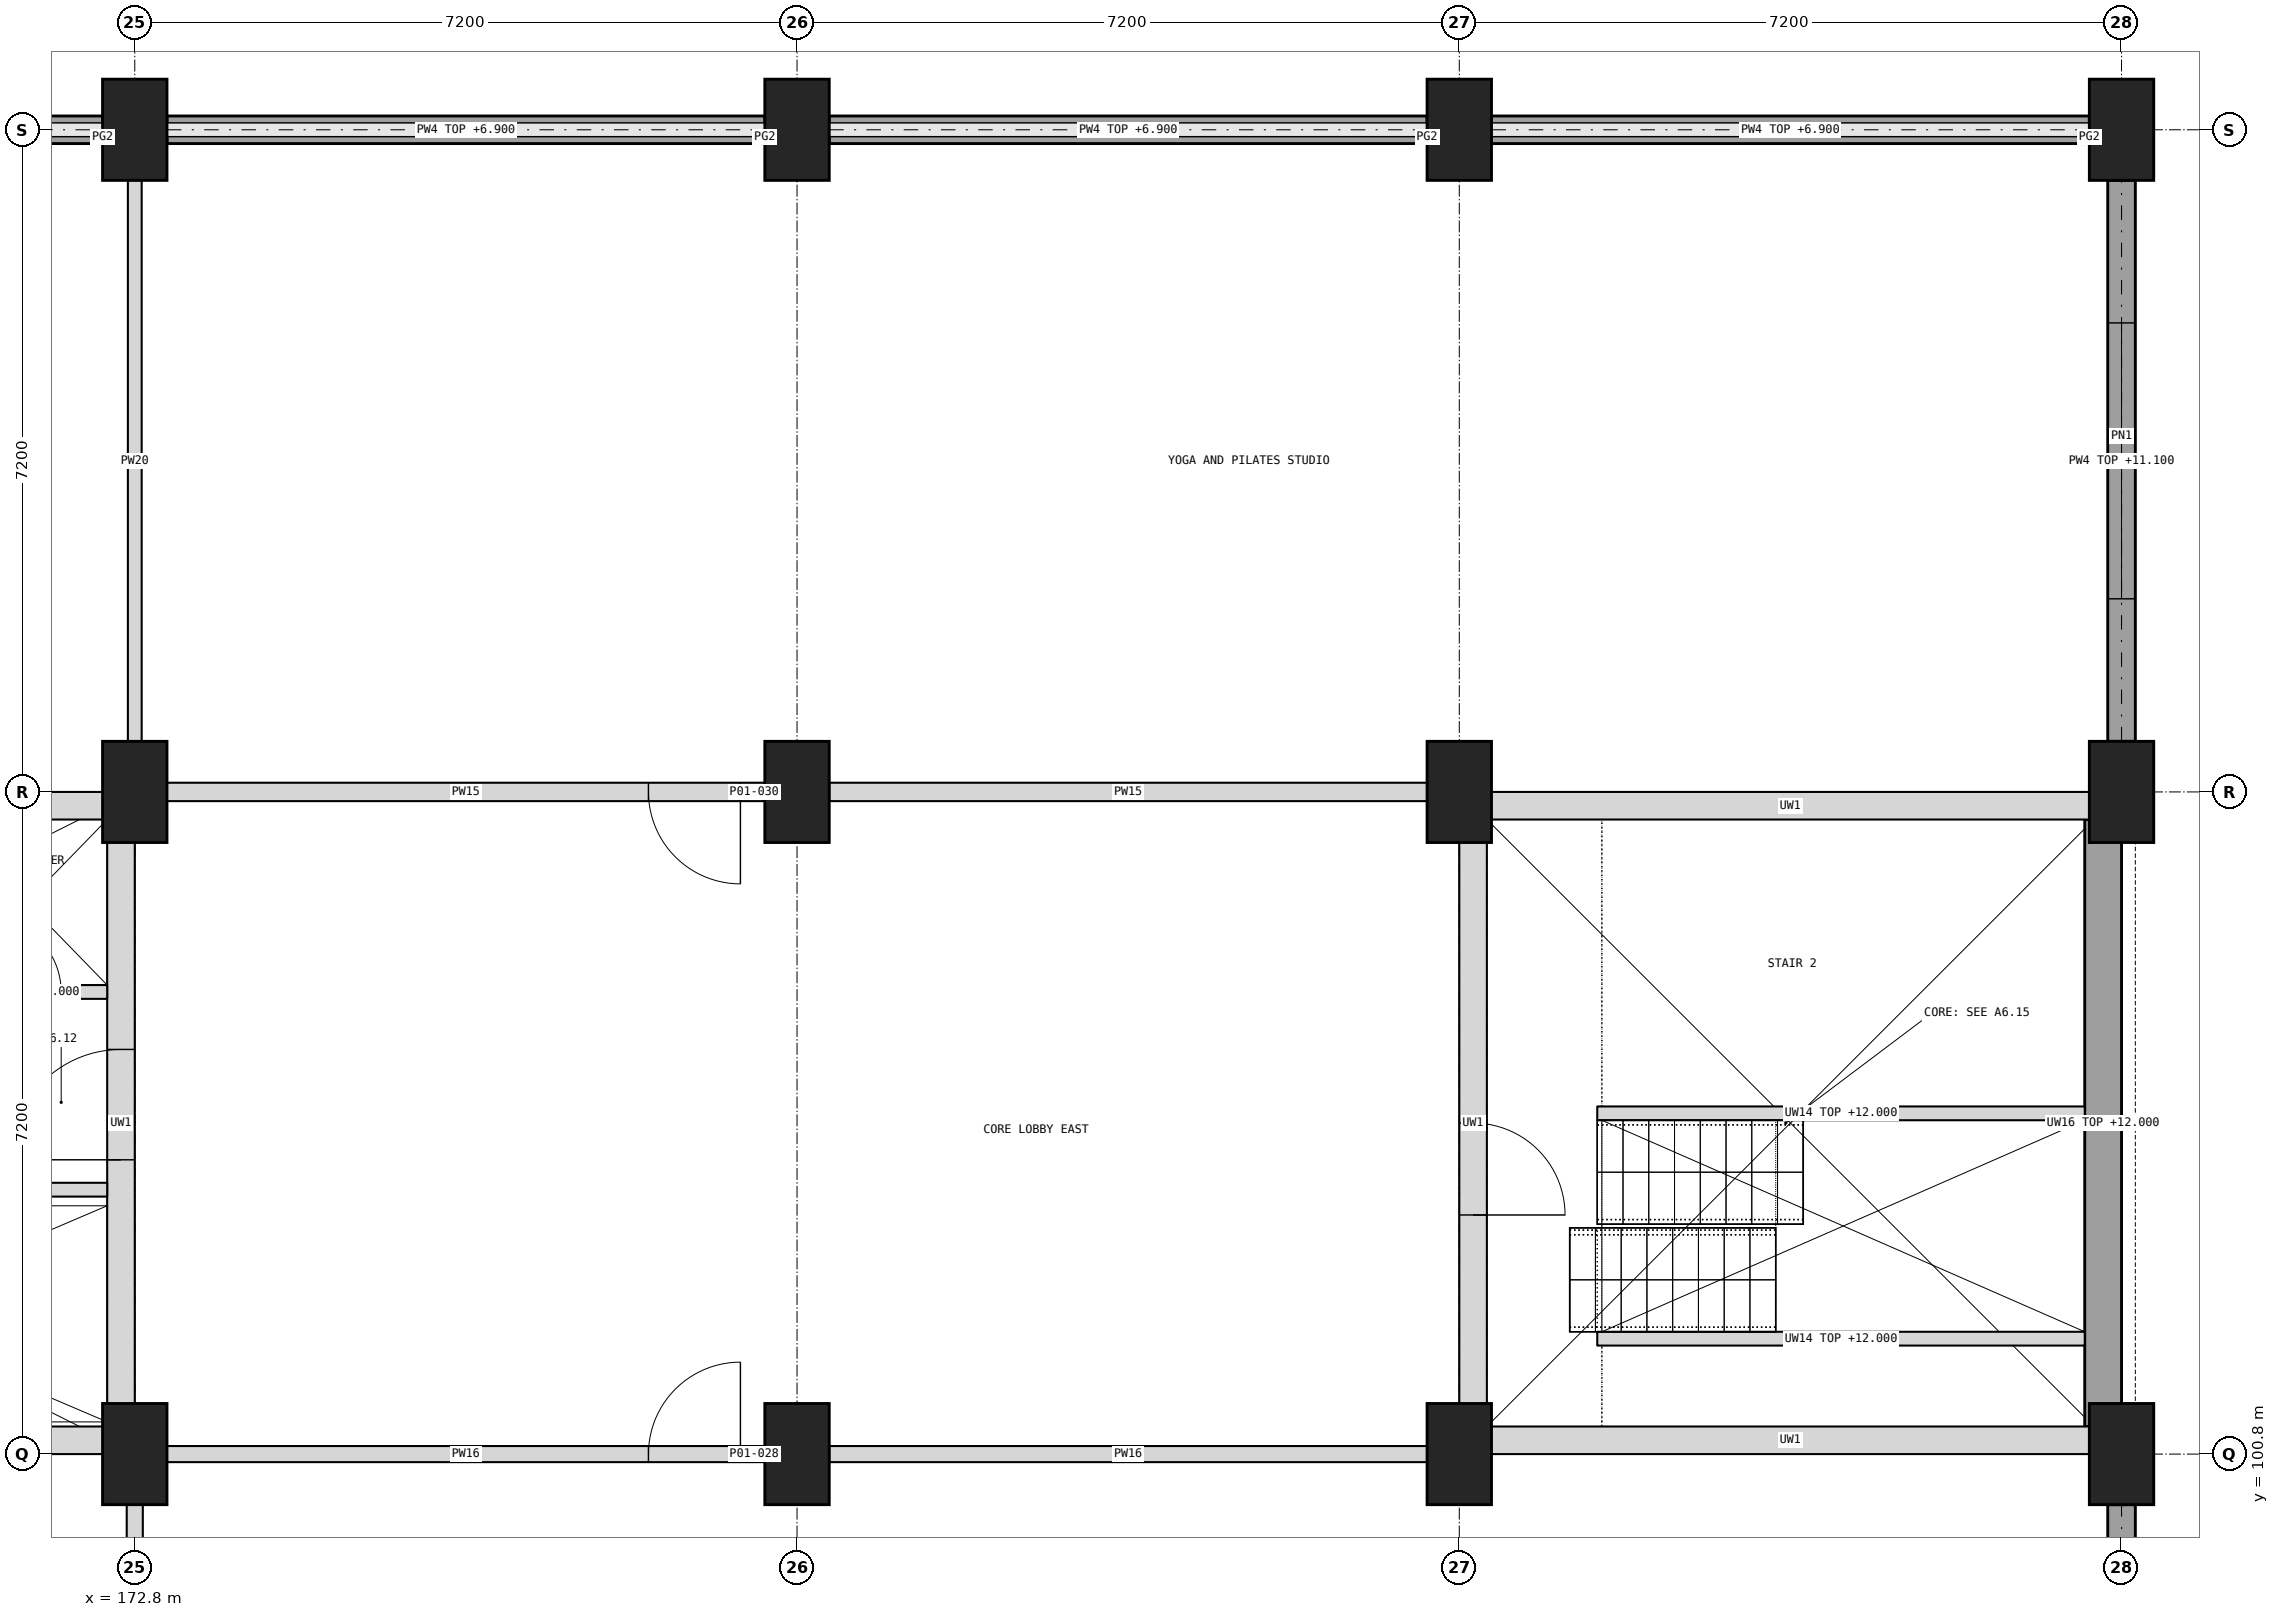
"""IFC4 building model, lengths in metres.
Left out: names, types, materials, properties, quantities, classifications, styles, units other than length and angle.
Written with IfcOpenShell. Run it as: python <this file> out.ifc"""

import sys

from ifc_helpers import new_model, si_unit, direction, frame, frame_2d, origin, origin_2d, place, context, subcontext, project, spatial, rectangle, extrude, element, fill, save


model = new_model("IFC4")
c1 = context("Model", 3, precision=1e-05, world=origin(), true_north=direction((0.0, 1.0)))
c2 = subcontext(c1, "Body", "Model", "MODEL_VIEW")
j1 = project(units=[si_unit("LENGTHUNIT", "METRE"), si_unit("PLANEANGLEUNIT", "RADIAN")], contexts=[c1])
p1 = place(None, origin())
s1 = spatial("IfcSite", under=j1, at=p1, CompositionType="ELEMENT")
p2 = place(p1, origin())
s2 = spatial("IfcBuilding", under=s1, at=p2, CompositionType="ELEMENT")
p3 = place(p2, frame((0.0, 0.0, 6.0)))
s3 = spatial("IfcBuildingStorey", under=s2, at=p3, CompositionType="ELEMENT", Elevation=6.0)
for number, where, z_axis, x_axis in (
    (1, (172.8, 100.8, 0.0), (0.0, 0.0, 1.0), (1.0, 0.0, 0.0)),
    (2, (172.8, 108.0, 0.0), (0.0, 0.0, 1.0), (1.0, 0.0, 0.0)),
    (3, (172.8, 115.2, 0.0), (0.0, 0.0, 1.0), (1.0, 0.0, 0.0)),
    (4, (180.0, 100.8, 0.0), (0.0, 0.0, 1.0), (1.0, 0.0, 0.0)),
    (5, (180.0, 108.0, 0.0), (0.0, 0.0, 1.0), (1.0, 0.0, 0.0)),
    (6, (180.0, 115.2, 0.0), (0.0, 0.0, 1.0), (1.0, 0.0, 0.0)),
    (7, (187.2, 100.8, 0.0), (0.0, 0.0, 1.0), (1.0, 0.0, 0.0)),
    (8, (187.2, 108.0, 0.0), (0.0, 0.0, 1.0), (1.0, 0.0, 0.0)),
    (9, (187.2, 115.2, 0.0), (0.0, 0.0, 1.0), (1.0, 0.0, 0.0)),
    (10, (194.4, 100.8, 0.0), (0.0, 0.0, 1.0), (1.0, 0.0, 0.0)),
    (11, (194.4, 108.0, 0.0), (0.0, 0.0, 1.0), (1.0, 0.0, 0.0)),
    (12, (194.4, 115.2, 0.0), (0.0, 0.0, 1.0), (1.0, 0.0, 0.0)),
):
    element("IfcColumn", number, at=place(p3, frame(where, z_axis=z_axis, x_axis=x_axis)), inside=s3, PredefinedType="COLUMN", context=c2, shape_type="SweptSolid", body=[
        extrude(rectangle(XDim=0.7, YDim=1.1, at=origin_2d()), origin(), (0.0, 0.0, 1.0), 6.0),
    ])
for number, where, z_axis, x_axis in (
    (13, (158.4, 100.95, 0.0), (0.0, 0.0, 1.0), (1.0, 0.0, 0.0)),
    (14, (158.4, 107.85, 0.0), (0.0, 0.0, 1.0), (1.0, 0.0, 0.0)),
):
    element("IfcWall", number, at=place(p3, frame(where, z_axis=z_axis, x_axis=x_axis)), inside=s3, PredefinedType="SHEAR", context=c2, shape_type="SweptSolid", body=[
        extrude(rectangle(XDim=14.4, YDim=0.3, at=frame_2d((7.2, 0.0))), origin(), (0.0, 0.0, 1.0), 6.0),
    ])
p4 = place(p3, frame((172.65, 101.1, 0.0), z_axis=(0.0, 0.0, 1.0), x_axis=(0.0, 1.0, 0.0)))
e15 = element("IfcWall", 15, at=p4, inside=s3, PredefinedType="SHEAR", context=c2, shape_type="SweptSolid", body=[
    extrude(rectangle(XDim=6.6, YDim=0.3, at=frame_2d((3.3, 0.0))), origin(), (0.0, 0.0, 1.0), 6.0),
])
p5 = place(p4, frame((2.9, 0.0, 0.0)))
e16 = element("IfcOpeningElement", 16, at=p5, cuts=e15, PredefinedType="OPENING", context=c2, shape_type="SweptSolid", body=[
    extrude(rectangle(XDim=1.2, YDim=2.1, at=frame_2d((0.6, 1.05))), frame((0.0, 0.16, 0.0), z_axis=(0.0, -1.0, 0.0), x_axis=(1.0, 0.0, 0.0)), (0.0, 0.0, 1.0), 0.32),
])
p6 = place(p3, frame((165.75, 103.675, 0.0), z_axis=(0.0, 0.0, 1.0), x_axis=(1.0, 0.0, 0.0)))
e17 = element("IfcWall", 17, at=p6, inside=s3, PredefinedType="SHEAR", context=c2, shape_type="SweptSolid", body=[
    extrude(rectangle(XDim=6.75, YDim=0.15, at=frame_2d((3.375, 0.0))), origin(), (0.0, 0.0, 1.0), 6.0),
])
p7 = place(p6, frame((0.1, 0.0, 0.0)))
e18 = element("IfcOpeningElement", 18, at=p7, cuts=e17, PredefinedType="OPENING", context=c2, shape_type="SweptSolid", body=[
    extrude(rectangle(XDim=1.0, YDim=2.1, at=frame_2d((0.5, 1.05))), frame((0.0, 0.085, 0.0), z_axis=(0.0, -1.0, 0.0), x_axis=(1.0, 0.0, 0.0)), (0.0, 0.0, 1.0), 0.17),
])
p8 = place(p3, frame((170.75, 105.825, 0.0), z_axis=(0.0, 0.0, 1.0), x_axis=(1.0, 0.0, 0.0)))
e19 = element("IfcWall", 19, at=p8, inside=s3, PredefinedType="PARTITIONING", context=c2, shape_type="SweptSolid", body=[
    extrude(rectangle(XDim=1.75, YDim=0.15, at=frame_2d((0.875, 0.0))), origin(), (0.0, 0.0, 1.0), 6.0),
])
p9 = place(p8, frame((0.45, 0.0, 0.0)))
e20 = element("IfcOpeningElement", 20, at=p9, cuts=e19, PredefinedType="OPENING", context=c2, shape_type="SweptSolid", body=[
    extrude(rectangle(XDim=0.8, YDim=2.1, at=frame_2d((0.4, 1.05))), frame((0.0, 0.085, 0.0), z_axis=(0.0, -1.0, 0.0), x_axis=(1.0, 0.0, 0.0)), (0.0, 0.0, 1.0), 0.17),
])
for number, where, z_axis, x_axis in (
    (21, (194.4, 100.95, 0.0), (0.0, 0.0, 1.0), (-1.0, 0.0, 0.0)),
    (22, (194.4, 107.85, 0.0), (0.0, 0.0, 1.0), (-1.0, 0.0, 0.0)),
):
    element("IfcWall", number, at=place(p3, frame(where, z_axis=z_axis, x_axis=x_axis)), inside=s3, PredefinedType="SHEAR", context=c2, shape_type="SweptSolid", body=[
        extrude(rectangle(XDim=7.2, YDim=0.3, at=frame_2d((3.6, 0.0))), origin(), (0.0, 0.0, 1.0), 6.0),
    ])
p10 = place(p3, frame((187.35, 101.1, 0.0), z_axis=(0.0, 0.0, 1.0), x_axis=(0.0, 1.0, 0.0)))
e23 = element("IfcWall", 23, at=p10, inside=s3, PredefinedType="SHEAR", context=c2, shape_type="SweptSolid", body=[
    extrude(rectangle(XDim=6.6, YDim=0.3, at=frame_2d((3.3, 0.0))), origin(), (0.0, 0.0, 1.0), 6.0),
])
p11 = place(p10, frame((2.3, 0.0, 0.0)))
e24 = element("IfcOpeningElement", 24, at=p11, cuts=e23, PredefinedType="OPENING", context=c2, shape_type="SweptSolid", body=[
    extrude(rectangle(XDim=1.0, YDim=2.1, at=frame_2d((0.5, 1.05))), frame((0.0, 0.16, 0.0), z_axis=(0.0, -1.0, 0.0), x_axis=(1.0, 0.0, 0.0)), (0.0, 0.0, 1.0), 0.32),
])
p12 = place(p3, frame((194.2, 101.1, 0.0), z_axis=(0.0, 0.0, 1.0), x_axis=(0.0, 1.0, 0.0)))
e25 = element("IfcWall", 25, at=p12, inside=s3, PredefinedType="SHEAR", context=c2, shape_type="SweptSolid", body=[
    extrude(rectangle(XDim=6.6, YDim=0.4, at=frame_2d((3.3, 0.0))), origin(), (0.0, 0.0, 1.0), 6.0),
])
for number, where, z_axis, x_axis in (
    (26, (188.7, 102.055, 0.0), (0.0, 0.0, 1.0), (1.0, 0.0, 0.0)),
    (27, (188.7, 104.505, 0.0), (0.0, 0.0, 1.0), (1.0, 0.0, 0.0)),
):
    element("IfcWall", number, at=place(p3, frame(where, z_axis=z_axis, x_axis=x_axis)), inside=s3, PredefinedType="SHEAR", context=c2, shape_type="SweptSolid", body=[
        extrude(rectangle(XDim=5.3, YDim=0.15, at=frame_2d((2.65, 0.0))), origin(), (0.0, 0.0, 1.0), 6.0),
    ])
for number, where, z_axis, x_axis in (
    (28, (165.95, 115.2, 0.0), (0.0, 0.0, 1.0), (1.0, 0.0, 0.0)),
    (29, (173.15, 115.2, 0.0), (0.0, 0.0, 1.0), (1.0, 0.0, 0.0)),
    (30, (180.35, 115.2, 0.0), (0.0, 0.0, 1.0), (1.0, 0.0, 0.0)),
    (31, (187.55, 115.2, 0.0), (0.0, 0.0, 1.0), (1.0, 0.0, 0.0)),
):
    element("IfcWall", number, at=place(p3, frame(where, z_axis=z_axis, x_axis=x_axis)), inside=s3, PredefinedType="SOLIDWALL", context=c2, shape_type="SweptSolid", body=[
        extrude(rectangle(XDim=6.5, YDim=0.3, at=frame_2d((3.25, 0.0))), origin(), (0.0, 0.0, 1.0), 0.9),
    ])
p13 = place(p3, frame((194.4, 94.15, 0.0), z_axis=(0.0, 0.0, 1.0), x_axis=(0.0, 1.0, 0.0)))
e32 = element("IfcWall", 32, at=p13, inside=s3, PredefinedType="SOLIDWALL", context=c2, shape_type="SweptSolid", body=[
    extrude(rectangle(XDim=6.1, YDim=0.3, at=frame_2d((3.05, 0.0))), origin(), (0.0, 0.0, 1.0), 5.1),
])
p14 = place(p13, frame((2.475, 0.0, 0.9)))
e33 = element("IfcOpeningElement", 33, at=p14, cuts=e32, PredefinedType="OPENING", context=c2, shape_type="SweptSolid", body=[
    extrude(rectangle(XDim=3.0, YDim=2.4, at=frame_2d((1.5, 1.2))), frame((0.0, 0.16, 0.0), z_axis=(0.0, -1.0, 0.0), x_axis=(1.0, 0.0, 0.0)), (0.0, 0.0, 1.0), 0.32),
])
p15 = place(p3, frame((194.4, 108.55, 0.0), z_axis=(0.0, 0.0, 1.0), x_axis=(0.0, 1.0, 0.0)))
e34 = element("IfcWall", 34, at=p15, inside=s3, PredefinedType="SOLIDWALL", context=c2, shape_type="SweptSolid", body=[
    extrude(rectangle(XDim=6.1, YDim=0.3, at=frame_2d((3.05, 0.0))), origin(), (0.0, 0.0, 1.0), 5.1),
])
p16 = place(p15, frame((1.55, 0.0, 0.9)))
e35 = element("IfcOpeningElement", 35, at=p16, cuts=e34, PredefinedType="OPENING", context=c2, shape_type="SweptSolid", body=[
    extrude(rectangle(XDim=3.0, YDim=2.4, at=frame_2d((1.5, 1.2))), frame((0.0, 0.16, 0.0), z_axis=(0.0, -1.0, 0.0), x_axis=(1.0, 0.0, 0.0)), (0.0, 0.0, 1.0), 0.32),
])
p17 = place(p3, frame((172.8, 96.087, 0.0), z_axis=(0.0, 0.0, 1.0), x_axis=(0.0, 1.0, 0.0)))
e36 = element("IfcWall", 36, at=p17, inside=s3, PredefinedType="PARTITIONING", context=c2, shape_type="SweptSolid", body=[
    extrude(rectangle(XDim=4.163, YDim=0.175, at=frame_2d((2.081, 0.0))), origin(), (0.0, 0.0, 1.0), 5.5),
])
p18 = place(p3, frame((172.8, 108.55, 0.0), z_axis=(0.0, 0.0, 1.0), x_axis=(0.0, 1.0, 0.0)))
e37 = element("IfcWall", 37, at=p18, inside=s3, PredefinedType="PARTITIONING", context=c2, shape_type="SweptSolid", body=[
    extrude(rectangle(XDim=6.1, YDim=0.15, at=frame_2d((3.05, 0.0))), origin(), (0.0, 0.0, 1.0), 5.5),
])
p19 = place(p3, frame((173.15, 108.0, 0.0), z_axis=(0.0, 0.0, 1.0), x_axis=(1.0, 0.0, 0.0)))
e38 = element("IfcWall", 38, at=p19, inside=s3, PredefinedType="PARTITIONING", context=c2, shape_type="SweptSolid", body=[
    extrude(rectangle(XDim=6.5, YDim=0.2, at=frame_2d((3.25, 0.0))), origin(), (0.0, 0.0, 1.0), 5.5),
])
p20 = place(p19, frame((5.235, 0.0, 0.0)))
e39 = element("IfcOpeningElement", 39, at=p20, cuts=e38, PredefinedType="OPENING", context=c2, shape_type="SweptSolid", body=[
    extrude(rectangle(XDim=1.0, YDim=2.1, at=frame_2d((0.5, 1.05))), frame((0.0, 0.11, 0.0), z_axis=(0.0, -1.0, 0.0), x_axis=(1.0, 0.0, 0.0)), (0.0, 0.0, 1.0), 0.22),
])
p21 = place(p3, frame((180.35, 108.0, 0.0), z_axis=(0.0, 0.0, 1.0), x_axis=(1.0, 0.0, 0.0)))
e40 = element("IfcWall", 40, at=p21, inside=s3, PredefinedType="PARTITIONING", context=c2, shape_type="SweptSolid", body=[
    extrude(rectangle(XDim=6.5, YDim=0.2, at=frame_2d((3.25, 0.0))), origin(), (0.0, 0.0, 1.0), 5.5),
])
p22 = place(p3, frame((173.15, 100.8, 0.0), z_axis=(0.0, 0.0, 1.0), x_axis=(1.0, 0.0, 0.0)))
e41 = element("IfcWall", 41, at=p22, inside=s3, PredefinedType="PARTITIONING", context=c2, shape_type="SweptSolid", body=[
    extrude(rectangle(XDim=6.5, YDim=0.175, at=frame_2d((3.25, 0.0))), origin(), (0.0, 0.0, 1.0), 5.5),
])
p23 = place(p22, frame((5.235, 0.0, 0.0)))
e42 = element("IfcOpeningElement", 42, at=p23, cuts=e41, PredefinedType="OPENING", context=c2, shape_type="SweptSolid", body=[
    extrude(rectangle(XDim=1.0, YDim=2.1, at=frame_2d((0.5, 1.05))), frame((0.0, 0.097, 0.0), z_axis=(0.0, -1.0, 0.0), x_axis=(1.0, 0.0, 0.0)), (0.0, 0.0, 1.0), 0.195),
])
p24 = place(p3, frame((180.35, 100.8, 0.0), z_axis=(0.0, 0.0, 1.0), x_axis=(1.0, 0.0, 0.0)))
e43 = element("IfcWall", 43, at=p24, inside=s3, PredefinedType="PARTITIONING", context=c2, shape_type="SweptSolid", body=[
    extrude(rectangle(XDim=6.5, YDim=0.175, at=frame_2d((3.25, 0.0))), origin(), (0.0, 0.0, 1.0), 5.5),
])
p25 = place(p16, origin())
e44 = element("IfcWindow", 44, at=p25, inside=s3, PartitioningType="DOUBLE_PANEL_VERTICAL", PredefinedType="WINDOW", context=c2, shape_type="SweptSolid", body=[
    extrude(rectangle(XDim=3.0, YDim=2.4, at=frame_2d((1.5, 1.2))), frame((0.0, 0.12, 0.0), z_axis=(0.0, -1.0, 0.0), x_axis=(1.0, 0.0, 0.0)), (0.0, 0.0, 1.0), 0.06),
])
fill(e35, e44)
p26 = place(p23, origin())
e45 = element("IfcDoor", 45, at=p26, inside=s3, OperationType="SINGLE_SWING_RIGHT", PredefinedType="DOOR", context=c2, shape_type="SweptSolid", body=[
    extrude(rectangle(XDim=1.0, YDim=2.1, at=frame_2d((0.5, 1.05))), frame((0.0, 0.025, 0.0), z_axis=(0.0, -1.0, 0.0), x_axis=(1.0, 0.0, 0.0)), (0.0, 0.0, 1.0), 0.05),
])
fill(e42, e45)
p27 = place(p20, frame((1.0, 0.0, 0.0), z_axis=(0.0, 0.0, 1.0), x_axis=(-1.0, 0.0, 0.0)))
e46 = element("IfcDoor", 46, at=p27, inside=s3, OperationType="SINGLE_SWING_LEFT", PredefinedType="DOOR", context=c2, shape_type="SweptSolid", body=[
    extrude(rectangle(XDim=1.0, YDim=2.1, at=frame_2d((0.5, 1.05))), frame((0.0, 0.025, 0.0), z_axis=(0.0, -1.0, 0.0), x_axis=(1.0, 0.0, 0.0)), (0.0, 0.0, 1.0), 0.05),
])
fill(e39, e46)
p28 = place(p5, origin())
e47 = element("IfcDoor", 47, at=p28, inside=s3, OperationType="SINGLE_SWING_LEFT", PredefinedType="DOOR", context=c2, shape_type="SweptSolid", body=[
    extrude(rectangle(XDim=1.2, YDim=2.1, at=frame_2d((0.6, 1.05))), frame((0.0, 0.025, 0.0), z_axis=(0.0, -1.0, 0.0), x_axis=(1.0, 0.0, 0.0)), (0.0, 0.0, 1.0), 0.05),
])
fill(e16, e47)
p29 = place(p9, origin())
e48 = element("IfcDoor", 48, at=p29, inside=s3, OperationType="SINGLE_SWING_LEFT", PredefinedType="DOOR", context=c2, shape_type="SweptSolid", body=[
    extrude(rectangle(XDim=0.8, YDim=2.1, at=frame_2d((0.4, 1.05))), frame((0.0, 0.025, 0.0), z_axis=(0.0, -1.0, 0.0), x_axis=(1.0, 0.0, 0.0)), (0.0, 0.0, 1.0), 0.05),
])
fill(e20, e48)
p30 = place(p11, frame((1.0, 0.0, 0.0), z_axis=(0.0, 0.0, 1.0), x_axis=(-1.0, 0.0, 0.0)))
e49 = element("IfcDoor", 49, at=p30, inside=s3, OperationType="SINGLE_SWING_RIGHT", PredefinedType="DOOR", context=c2, shape_type="SweptSolid", body=[
    extrude(rectangle(XDim=1.0, YDim=2.1, at=frame_2d((0.5, 1.05))), frame((0.0, 0.025, 0.0), z_axis=(0.0, -1.0, 0.0), x_axis=(1.0, 0.0, 0.0)), (0.0, 0.0, 1.0), 0.05),
])
fill(e24, e49)
save(model, sys.argv[1])
